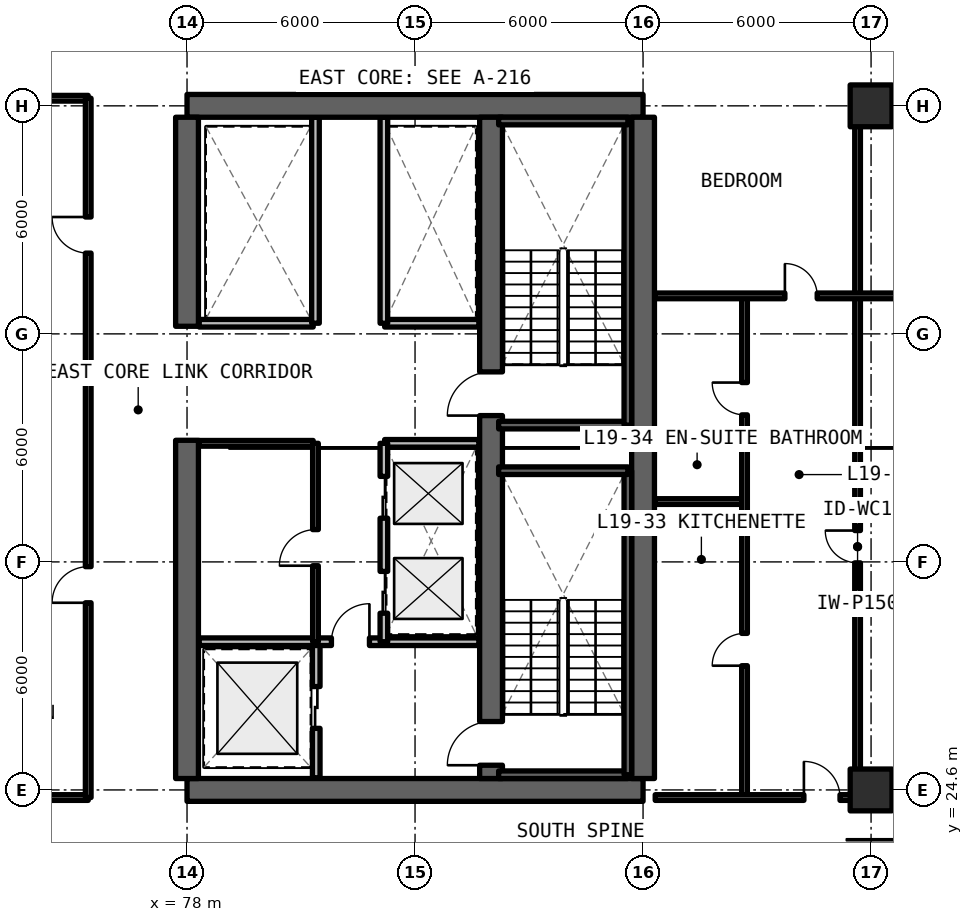
"""IFC4 building model, lengths in metres.
Left out: names, types, materials, properties, quantities, classifications, styles, units other than length and angle.
Written with IfcOpenShell. Run it as: python <this file> out.ifc"""

import sys

from ifc_helpers import new_model, si_unit, direction, frame, frame_2d, origin, origin_2d, place, context, subcontext, project, spatial, rectangle, extrude, element, fill, save


model = new_model("IFC4")
c1 = context("Model", 3, precision=1e-05, world=origin(), true_north=direction((0.0, 1.0)))
c2 = subcontext(c1, "Body", "Model", "MODEL_VIEW")
j1 = project(units=[si_unit("LENGTHUNIT", "METRE"), si_unit("PLANEANGLEUNIT", "RADIAN")], contexts=[c1])
p1 = place(None, origin())
s1 = spatial("IfcSite", under=j1, at=p1, CompositionType="ELEMENT")
p2 = place(p1, origin())
s2 = spatial("IfcBuilding", under=s1, at=p2, CompositionType="ELEMENT")
p3 = place(p2, frame((0.0, 0.0, 69.63)))
s3 = spatial("IfcBuildingStorey", under=s2, at=p3, CompositionType="ELEMENT", Elevation=69.63)
for number, where, z_axis, x_axis in (
    (1, (78.0, 24.6, 0.0), (0.0, 0.0, 1.0), (1.0, 0.0, 0.0)),
    (2, (90.0, 42.6, 0.0), (0.0, 0.0, 1.0), (-1.0, 0.0, 0.0)),
):
    element("IfcWall", number, at=place(p3, frame(where, z_axis=z_axis, x_axis=x_axis)), inside=s3, PredefinedType="SHEAR", context=c2, shape_type="SweptSolid", body=[
        extrude(rectangle(XDim=12.0, YDim=0.6, at=frame_2d((6.0, 0.0))), origin(), (0.0, 0.0, 1.0), 3.63),
    ])
p4 = place(p3, frame((90.0, 24.9, 0.0), z_axis=(0.0, 0.0, 1.0), x_axis=(0.0, 1.0, 0.0)))
e3 = element("IfcWall", 3, at=p4, inside=s3, PredefinedType="SHEAR", context=c2, shape_type="SweptSolid", body=[
    extrude(rectangle(XDim=17.4, YDim=0.6, at=frame_2d((8.7, 0.0))), origin(), (0.0, 0.0, 1.0), 3.63),
])
p5 = place(p3, frame((78.0, 24.9, 0.0), z_axis=(0.0, 0.0, 1.0), x_axis=(0.0, 1.0, 0.0)))
e4 = element("IfcWall", 4, at=p5, inside=s3, PredefinedType="SHEAR", context=c2, shape_type="SweptSolid", body=[
    extrude(rectangle(XDim=8.9, YDim=0.6, at=frame_2d((4.45, 0.0))), origin(), (0.0, 0.0, 1.0), 3.63),
])
p6 = place(p3, frame((78.0, 36.8, 0.0), z_axis=(0.0, 0.0, 1.0), x_axis=(0.0, 1.0, 0.0)))
e5 = element("IfcWall", 5, at=p6, inside=s3, PredefinedType="SHEAR", context=c2, shape_type="SweptSolid", body=[
    extrude(rectangle(XDim=5.5, YDim=0.6, at=frame_2d((2.75, 0.0))), origin(), (0.0, 0.0, 1.0), 3.63),
])
p7 = place(p3, frame((86.0, 24.9, 0.0), z_axis=(0.0, 0.0, 1.0), x_axis=(0.0, 1.0, 0.0)))
e6 = element("IfcWall", 6, at=p7, inside=s3, PredefinedType="SHEAR", context=c2, shape_type="SweptSolid", body=[
    extrude(rectangle(XDim=17.4, YDim=0.6, at=frame_2d((8.7, 0.0))), origin(), (0.0, 0.0, 1.0), 3.63),
])
p8 = place(p7, frame((0.35, 0.0, 0.0)))
e7 = element("IfcOpeningElement", 7, at=p8, cuts=e6, PredefinedType="OPENING", context=c2, shape_type="SweptSolid", body=[
    extrude(rectangle(XDim=1.15, YDim=2.15, at=frame_2d((0.575, 1.075))), frame((0.0, 0.31, 0.0), z_axis=(0.0, -1.0, 0.0), x_axis=(1.0, 0.0, 0.0)), (0.0, 0.0, 1.0), 0.62),
])
p9 = place(p7, frame((9.55, 0.0, 0.0)))
e8 = element("IfcOpeningElement", 8, at=p9, cuts=e6, PredefinedType="OPENING", context=c2, shape_type="SweptSolid", body=[
    extrude(rectangle(XDim=1.15, YDim=2.15, at=frame_2d((0.575, 1.075))), frame((0.0, 0.31, 0.0), z_axis=(0.0, -1.0, 0.0), x_axis=(1.0, 0.0, 0.0)), (0.0, 0.0, 1.0), 0.62),
])
for number, where, z_axis, x_axis in (
    (9, (96.0, 24.6, 0.0), (0.0, 0.0, 1.0), (1.0, 0.0, 0.0)),
    (10, (96.0, 42.6, 0.0), (0.0, 0.0, 1.0), (1.0, 0.0, 0.0)),
):
    element("IfcColumn", number, at=place(p3, frame(where, z_axis=z_axis, x_axis=x_axis)), inside=s3, PredefinedType="COLUMN", context=c2, shape_type="SweptSolid", body=[
        extrude(rectangle(XDim=1.1, YDim=1.1, at=origin_2d()), origin(), (0.0, 0.0, 1.0), 3.63),
    ])
p10 = place(p3, frame((81.4, 24.92, 0.0), z_axis=(0.0, 0.0, 1.0), x_axis=(0.0, 1.0, 0.0)))
e11 = element("IfcWall", 11, at=p10, inside=s3, PredefinedType="SOLIDWALL", context=c2, shape_type="SweptSolid", body=[
    extrude(rectangle(XDim=3.58, YDim=0.2, at=frame_2d((1.79, 0.0))), origin(), (0.0, 0.0, 1.0), 2.57),
])
p11 = place(p10, frame((1.3, 0.0, 0.0)))
e12 = element("IfcOpeningElement", 12, at=p11, cuts=e11, PredefinedType="OPENING", context=c2, shape_type="SweptSolid", body=[
    extrude(rectangle(XDim=1.1, YDim=2.2, at=frame_2d((0.55, 1.1))), frame((0.0, 0.11, 0.0), z_axis=(0.0, -1.0, 0.0), x_axis=(1.0, 0.0, 0.0)), (0.0, 0.0, 1.0), 0.22),
])
p12 = place(p3, frame((78.32, 28.5, 0.0), z_axis=(0.0, 0.0, 1.0), x_axis=(1.0, 0.0, 0.0)))
e13 = element("IfcWall", 13, at=p12, inside=s3, PredefinedType="SOLIDWALL", context=c2, shape_type="SweptSolid", body=[
    extrude(rectangle(XDim=7.36, YDim=0.2, at=frame_2d((3.68, 0.0))), origin(), (0.0, 0.0, 1.0), 2.57),
])
p13 = place(p12, frame((3.48, 0.0, 0.0)))
e14 = element("IfcOpeningElement", 14, at=p13, cuts=e13, PredefinedType="OPENING", context=c2, shape_type="SweptSolid", body=[
    extrude(rectangle(XDim=1.0, YDim=2.15, at=frame_2d((0.5, 1.075))), frame((0.0, 0.11, 0.0), z_axis=(0.0, -1.0, 0.0), x_axis=(1.0, 0.0, 0.0)), (0.0, 0.0, 1.0), 0.22),
])
p14 = place(p3, frame((83.2, 33.72, 0.0), z_axis=(0.0, 0.0, 1.0), x_axis=(1.0, 0.0, 0.0)))
e15 = element("IfcWall", 15, at=p14, inside=s3, PredefinedType="SOLIDWALL", context=c2, shape_type="SweptSolid", body=[
    extrude(rectangle(XDim=2.48, YDim=0.2, at=frame_2d((1.24, 0.0))), origin(), (0.0, 0.0, 1.0), 2.57),
])
p15 = place(p3, frame((83.18, 28.5, 0.0), z_axis=(0.0, 0.0, 1.0), x_axis=(0.0, 1.0, 0.0)))
e16 = element("IfcWall", 16, at=p15, inside=s3, PredefinedType="SOLIDWALL", context=c2, shape_type="SweptSolid", body=[
    extrude(rectangle(XDim=5.22, YDim=0.2, at=frame_2d((2.61, 0.0))), origin(), (0.0, 0.0, 1.0), 2.57),
])
p16 = place(p15, frame((0.75, 0.0, 0.0)))
e17 = element("IfcOpeningElement", 17, at=p16, cuts=e16, PredefinedType="OPENING", context=c2, shape_type="SweptSolid", body=[
    extrude(rectangle(XDim=1.1, YDim=2.2, at=frame_2d((0.55, 1.1))), frame((0.0, 0.11, 0.0), z_axis=(0.0, -1.0, 0.0), x_axis=(1.0, 0.0, 0.0)), (0.0, 0.0, 1.0), 0.22),
])
p17 = place(p15, frame((3.25, 0.0, 0.0)))
e18 = element("IfcOpeningElement", 18, at=p17, cuts=e16, PredefinedType="OPENING", context=c2, shape_type="SweptSolid", body=[
    extrude(rectangle(XDim=1.1, YDim=2.2, at=frame_2d((0.55, 1.1))), frame((0.0, 0.11, 0.0), z_axis=(0.0, -1.0, 0.0), x_axis=(1.0, 0.0, 0.0)), (0.0, 0.0, 1.0), 0.22),
])
p18 = place(p3, frame((78.32, 33.72, 0.0), z_axis=(0.0, 0.0, 1.0), x_axis=(1.0, 0.0, 0.0)))
e19 = element("IfcWall", 19, at=p18, inside=s3, PredefinedType="SOLIDWALL", context=c2, shape_type="SweptSolid", body=[
    extrude(rectangle(XDim=3.0, YDim=0.15, at=frame_2d((1.5, 0.0))), origin(), (0.0, 0.0, 1.0), 2.57),
])
p19 = place(p3, frame((81.38, 28.5, 0.0), z_axis=(0.0, 0.0, 1.0), x_axis=(0.0, 1.0, 0.0)))
e20 = element("IfcWall", 20, at=p19, inside=s3, PredefinedType="SOLIDWALL", context=c2, shape_type="SweptSolid", body=[
    extrude(rectangle(XDim=5.22, YDim=0.15, at=frame_2d((2.61, 0.0))), origin(), (0.0, 0.0, 1.0), 2.57),
])
p20 = place(p19, frame((2.0, 0.0, 0.0)))
e21 = element("IfcOpeningElement", 21, at=p20, cuts=e20, PredefinedType="OPENING", context=c2, shape_type="SweptSolid", body=[
    extrude(rectangle(XDim=0.95, YDim=2.15, at=frame_2d((0.475, 1.075))), frame((0.0, 0.085, 0.0), z_axis=(0.0, -1.0, 0.0), x_axis=(1.0, 0.0, 0.0)), (0.0, 0.0, 1.0), 0.17),
])
p21 = place(p3, frame((83.2, 36.88, 0.0), z_axis=(0.0, 0.0, 1.0), x_axis=(1.0, 0.0, 0.0)))
e22 = element("IfcWall", 22, at=p21, inside=s3, PredefinedType="SOLIDWALL", context=c2, shape_type="SweptSolid", body=[
    extrude(rectangle(XDim=2.48, YDim=0.2, at=frame_2d((1.24, 0.0))), origin(), (0.0, 0.0, 1.0), 2.57),
])
p22 = place(p3, frame((83.18, 36.88, 0.0), z_axis=(0.0, 0.0, 1.0), x_axis=(0.0, 1.0, 0.0)))
e23 = element("IfcWall", 23, at=p22, inside=s3, PredefinedType="SOLIDWALL", context=c2, shape_type="SweptSolid", body=[
    extrude(rectangle(XDim=5.42, YDim=0.2, at=frame_2d((2.71, 0.0))), origin(), (0.0, 0.0, 1.0), 2.57),
])
p23 = place(p3, frame((78.32, 36.88, 0.0), z_axis=(0.0, 0.0, 1.0), x_axis=(1.0, 0.0, 0.0)))
e24 = element("IfcWall", 24, at=p23, inside=s3, PredefinedType="SOLIDWALL", context=c2, shape_type="SweptSolid", body=[
    extrude(rectangle(XDim=3.0, YDim=0.2, at=frame_2d((1.5, 0.0))), origin(), (0.0, 0.0, 1.0), 2.57),
])
p24 = place(p3, frame((81.38, 36.88, 0.0), z_axis=(0.0, 0.0, 1.0), x_axis=(0.0, 1.0, 0.0)))
e25 = element("IfcWall", 25, at=p24, inside=s3, PredefinedType="SOLIDWALL", context=c2, shape_type="SweptSolid", body=[
    extrude(rectangle(XDim=5.42, YDim=0.2, at=frame_2d((2.71, 0.0))), origin(), (0.0, 0.0, 1.0), 2.57),
])
p25 = place(p3, frame((71.1, 24.4, 0.0), z_axis=(0.0, 0.0, 1.0), x_axis=(1.0, 0.0, 0.0)))
e26 = element("IfcWall", 26, at=p25, inside=s3, PredefinedType="SOLIDWALL", context=c2, shape_type="SweptSolid", body=[
    extrude(rectangle(XDim=4.3, YDim=0.15, at=frame_2d((2.15, 0.0))), origin(), (0.0, 0.0, 1.0), 2.565),
])
p26 = place(p3, frame((71.1, 35.6, 0.0), z_axis=(0.0, 0.0, 1.0), x_axis=(1.0, 0.0, 0.0)))
e27 = element("IfcWall", 27, at=p26, inside=s3, PredefinedType="SOLIDWALL", context=c2, shape_type="SweptSolid", body=[
    extrude(rectangle(XDim=4.3, YDim=0.15, at=frame_2d((2.15, 0.0))), origin(), (0.0, 0.0, 1.0), 2.57),
])
p27 = place(p3, frame((75.4, 24.4, 0.0), z_axis=(0.0, 0.0, 1.0), x_axis=(0.0, 1.0, 0.0)))
e28 = element("IfcWall", 28, at=p27, inside=s3, PredefinedType="SOLIDWALL", context=c2, shape_type="SweptSolid", body=[
    extrude(rectangle(XDim=11.2, YDim=0.15, at=frame_2d((5.6, 0.0))), origin(), (0.0, 0.0, 1.0), 2.57),
])
p28 = place(p27, frame((5.125, 0.0, 0.0)))
e29 = element("IfcOpeningElement", 29, at=p28, cuts=e28, PredefinedType="OPENING", context=c2, shape_type="SweptSolid", body=[
    extrude(rectangle(XDim=0.95, YDim=2.15, at=frame_2d((0.475, 1.075))), frame((0.0, 0.085, 0.0), z_axis=(0.0, -1.0, 0.0), x_axis=(1.0, 0.0, 0.0)), (0.0, 0.0, 1.0), 0.17),
])
p29 = place(p3, frame((71.1, 42.8, 0.0), z_axis=(0.0, 0.0, 1.0), x_axis=(1.0, 0.0, 0.0)))
e30 = element("IfcWall", 30, at=p29, inside=s3, PredefinedType="SOLIDWALL", context=c2, shape_type="SweptSolid", body=[
    extrude(rectangle(XDim=4.3, YDim=0.15, at=frame_2d((2.15, 0.0))), origin(), (0.0, 0.0, 1.0), 2.565),
])
p30 = place(p3, frame((75.4, 35.6, 0.0), z_axis=(0.0, 0.0, 1.0), x_axis=(0.0, 1.0, 0.0)))
e31 = element("IfcWall", 31, at=p30, inside=s3, PredefinedType="SOLIDWALL", context=c2, shape_type="SweptSolid", body=[
    extrude(rectangle(XDim=7.2, YDim=0.15, at=frame_2d((3.6, 0.0))), origin(), (0.0, 0.0, 1.0), 2.57),
])
p31 = place(p30, frame((3.125, 0.0, 0.0)))
e32 = element("IfcOpeningElement", 32, at=p31, cuts=e31, PredefinedType="OPENING", context=c2, shape_type="SweptSolid", body=[
    extrude(rectangle(XDim=0.95, YDim=2.15, at=frame_2d((0.475, 1.075))), frame((0.0, 0.085, 0.0), z_axis=(0.0, -1.0, 0.0), x_axis=(1.0, 0.0, 0.0)), (0.0, 0.0, 1.0), 0.17),
])
p32 = place(p3, frame((95.645, 24.4, 0.0), z_axis=(0.0, 0.0, 1.0), x_axis=(0.0, 1.0, 0.0)))
e33 = element("IfcWall", 33, at=p32, inside=s3, PredefinedType="PARTITIONING", context=c2, shape_type="SweptSolid", body=[
    extrude(rectangle(XDim=13.2, YDim=0.15, at=frame_2d((6.6, 0.0))), origin(), (0.0, 0.0, 1.0), 2.57),
])
p33 = place(p32, frame((6.175, 0.0, 0.0)))
e34 = element("IfcOpeningElement", 34, at=p33, cuts=e33, PredefinedType="OPENING", context=c2, shape_type="SweptSolid", body=[
    extrude(rectangle(XDim=0.85, YDim=2.1, at=frame_2d((0.425, 1.05))), frame((0.0, 0.085, 0.0), z_axis=(0.0, -1.0, 0.0), x_axis=(1.0, 0.0, 0.0)), (0.0, 0.0, 1.0), 0.17),
])
p34 = place(p3, frame((90.32, 32.188, 0.0), z_axis=(0.0, 0.0, 1.0), x_axis=(1.0, 0.0, 0.0)))
e35 = element("IfcWall", 35, at=p34, inside=s3, PredefinedType="PARTITIONING", context=c2, shape_type="SweptSolid", body=[
    extrude(rectangle(XDim=2.35, YDim=0.15, at=frame_2d((1.175, 0.0))), origin(), (0.0, 0.0, 1.0), 2.57),
])
p35 = place(p3, frame((92.67, 24.4, 0.0), z_axis=(0.0, 0.0, 1.0), x_axis=(0.0, 1.0, 0.0)))
e36 = element("IfcWall", 36, at=p35, inside=s3, PredefinedType="PARTITIONING", context=c2, shape_type="SweptSolid", body=[
    extrude(rectangle(XDim=13.2, YDim=0.15, at=frame_2d((6.6, 0.0))), origin(), (0.0, 0.0, 1.0), 2.57),
])
p36 = place(p35, frame((3.469, 0.0, 0.0)))
e37 = element("IfcOpeningElement", 37, at=p36, cuts=e36, PredefinedType="OPENING", context=c2, shape_type="SweptSolid", body=[
    extrude(rectangle(XDim=0.85, YDim=2.1, at=frame_2d((0.425, 1.05))), frame((0.0, 0.085, 0.0), z_axis=(0.0, -1.0, 0.0), x_axis=(1.0, 0.0, 0.0)), (0.0, 0.0, 1.0), 0.17),
])
p37 = place(p35, frame((10.069, 0.0, 0.0)))
e38 = element("IfcOpeningElement", 38, at=p37, cuts=e36, PredefinedType="OPENING", context=c2, shape_type="SweptSolid", body=[
    extrude(rectangle(XDim=0.85, YDim=2.1, at=frame_2d((0.425, 1.05))), frame((0.0, 0.085, 0.0), z_axis=(0.0, -1.0, 0.0), x_axis=(1.0, 0.0, 0.0)), (0.0, 0.0, 1.0), 0.17),
])
p38 = place(p3, frame((95.645, 37.6, 0.0), z_axis=(0.0, 0.0, 1.0), x_axis=(0.0, 1.0, 0.0)))
e39 = element("IfcWall", 39, at=p38, inside=s3, PredefinedType="PARTITIONING", context=c2, shape_type="SweptSolid", body=[
    extrude(rectangle(XDim=5.2, YDim=0.15, at=frame_2d((2.6, 0.0))), origin(), (0.0, 0.0, 1.0), 2.57),
])
p39 = place(p3, frame((90.32, 37.6, 0.0), z_axis=(0.0, 0.0, 1.0), x_axis=(1.0, 0.0, 0.0)))
e40 = element("IfcWall", 40, at=p39, inside=s3, PredefinedType="PARTITIONING", context=c2, shape_type="SweptSolid", body=[
    extrude(rectangle(XDim=10.24, YDim=0.15, at=frame_2d((5.12, 0.0))), origin(), (0.0, 0.0, 1.0), 2.57),
])
p40 = place(p39, frame((3.412, 0.0, 0.0)))
e41 = element("IfcOpeningElement", 41, at=p40, cuts=e40, PredefinedType="OPENING", context=c2, shape_type="SweptSolid", body=[
    extrude(rectangle(XDim=0.85, YDim=2.1, at=frame_2d((0.425, 1.05))), frame((0.0, 0.085, 0.0), z_axis=(0.0, -1.0, 0.0), x_axis=(1.0, 0.0, 0.0)), (0.0, 0.0, 1.0), 0.17),
])
p41 = place(p39, frame((7.357, 0.0, 0.0)))
e42 = element("IfcOpeningElement", 42, at=p41, cuts=e40, PredefinedType="OPENING", context=c2, shape_type="SweptSolid", body=[
    extrude(rectangle(XDim=0.85, YDim=2.1, at=frame_2d((0.425, 1.05))), frame((0.0, 0.085, 0.0), z_axis=(0.0, -1.0, 0.0), x_axis=(1.0, 0.0, 0.0)), (0.0, 0.0, 1.0), 0.17),
])
p42 = place(p3, frame((90.32, 24.4, 0.0), z_axis=(0.0, 0.0, 1.0), x_axis=(1.0, 0.0, 0.0)))
e43 = element("IfcWall", 43, at=p42, inside=s3, PredefinedType="SOLIDWALL", context=c2, shape_type="SweptSolid", body=[
    extrude(rectangle(XDim=10.24, YDim=0.15, at=frame_2d((5.12, 0.0))), origin(), (0.0, 0.0, 1.0), 2.565),
])
p43 = place(p42, frame((3.913, 0.0, 0.0)))
e44 = element("IfcOpeningElement", 44, at=p43, cuts=e43, PredefinedType="OPENING", context=c2, shape_type="SweptSolid", body=[
    extrude(rectangle(XDim=0.95, YDim=2.15, at=frame_2d((0.475, 1.075))), frame((0.0, 0.085, 0.0), z_axis=(0.0, -1.0, 0.0), x_axis=(1.0, 0.0, 0.0)), (0.0, 0.0, 1.0), 0.17),
])
p44 = place(p3, frame((86.2, 25.0, 0.0), z_axis=(0.0, 0.0, 1.0), x_axis=(1.0, 0.0, 0.0)))
e45 = element("IfcWall", 45, at=p44, inside=s3, PredefinedType="SOLIDWALL", context=c2, shape_type="SweptSolid", body=[
    extrude(rectangle(XDim=3.4, YDim=0.2, at=frame_2d((1.7, 0.0))), origin(), (0.0, 0.0, 1.0), 3.63),
])
p45 = place(p3, frame((89.6, 25.0, 0.0), z_axis=(0.0, 0.0, 1.0), x_axis=(0.0, 1.0, 0.0)))
e46 = element("IfcWall", 46, at=p45, inside=s3, PredefinedType="SOLIDWALL", context=c2, shape_type="SweptSolid", body=[
    extrude(rectangle(XDim=8.0, YDim=0.2, at=frame_2d((4.0, 0.0))), origin(), (0.0, 0.0, 1.0), 3.63),
])
for number, where, z_axis, x_axis in (
    (47, (89.6, 33.0, 0.0), (0.0, 0.0, 1.0), (-1.0, 0.0, 0.0)),
    (48, (86.2, 34.2, 0.0), (0.0, 0.0, 1.0), (1.0, 0.0, 0.0)),
):
    element("IfcWall", number, at=place(p3, frame(where, z_axis=z_axis, x_axis=x_axis)), inside=s3, PredefinedType="SOLIDWALL", context=c2, shape_type="SweptSolid", body=[
        extrude(rectangle(XDim=3.4, YDim=0.2, at=frame_2d((1.7, 0.0))), origin(), (0.0, 0.0, 1.0), 3.63),
    ])
p46 = place(p3, frame((89.6, 34.2, 0.0), z_axis=(0.0, 0.0, 1.0), x_axis=(0.0, 1.0, 0.0)))
e49 = element("IfcWall", 49, at=p46, inside=s3, PredefinedType="SOLIDWALL", context=c2, shape_type="SweptSolid", body=[
    extrude(rectangle(XDim=8.0, YDim=0.2, at=frame_2d((4.0, 0.0))), origin(), (0.0, 0.0, 1.0), 3.63),
])
p47 = place(p3, frame((89.6, 42.2, 0.0), z_axis=(0.0, 0.0, 1.0), x_axis=(-1.0, 0.0, 0.0)))
e50 = element("IfcWall", 50, at=p47, inside=s3, PredefinedType="SOLIDWALL", context=c2, shape_type="SweptSolid", body=[
    extrude(rectangle(XDim=3.4, YDim=0.2, at=frame_2d((1.7, 0.0))), origin(), (0.0, 0.0, 1.0), 3.63),
])
p48 = place(p11, origin())
e51 = element("IfcDoor", 51, at=p48, inside=s3, OperationType="SLIDING_TO_LEFT", PredefinedType="DOOR", context=c2, shape_type="SweptSolid", body=[
    extrude(rectangle(XDim=1.1, YDim=2.2, at=frame_2d((0.55, 1.1))), frame((0.0, 0.025, 0.0), z_axis=(0.0, -1.0, 0.0), x_axis=(1.0, 0.0, 0.0)), (0.0, 0.0, 1.0), 0.05),
])
fill(e12, e51)
p49 = place(p13, origin())
e52 = element("IfcDoor", 52, at=p49, inside=s3, OperationType="SINGLE_SWING_RIGHT", PredefinedType="DOOR", context=c2, shape_type="SweptSolid", body=[
    extrude(rectangle(XDim=1.0, YDim=2.15, at=frame_2d((0.5, 1.075))), frame((0.0, 0.025, 0.0), z_axis=(0.0, -1.0, 0.0), x_axis=(1.0, 0.0, 0.0)), (0.0, 0.0, 1.0), 0.05),
])
fill(e14, e52)
p50 = place(p16, origin())
e53 = element("IfcDoor", 53, at=p50, inside=s3, OperationType="SLIDING_TO_LEFT", PredefinedType="DOOR", context=c2, shape_type="SweptSolid", body=[
    extrude(rectangle(XDim=1.1, YDim=2.2, at=frame_2d((0.55, 1.1))), frame((0.0, 0.025, 0.0), z_axis=(0.0, -1.0, 0.0), x_axis=(1.0, 0.0, 0.0)), (0.0, 0.0, 1.0), 0.05),
])
fill(e17, e53)
p51 = place(p17, origin())
e54 = element("IfcDoor", 54, at=p51, inside=s3, OperationType="SLIDING_TO_RIGHT", PredefinedType="DOOR", context=c2, shape_type="SweptSolid", body=[
    extrude(rectangle(XDim=1.1, YDim=2.2, at=frame_2d((0.55, 1.1))), frame((0.0, 0.025, 0.0), z_axis=(0.0, -1.0, 0.0), x_axis=(1.0, 0.0, 0.0)), (0.0, 0.0, 1.0), 0.05),
])
fill(e18, e54)
p52 = place(p20, origin())
e55 = element("IfcDoor", 55, at=p52, inside=s3, OperationType="SINGLE_SWING_LEFT", PredefinedType="DOOR", context=c2, shape_type="SweptSolid", body=[
    extrude(rectangle(XDim=0.95, YDim=2.15, at=frame_2d((0.475, 1.075))), frame((0.0, 0.025, 0.0), z_axis=(0.0, -1.0, 0.0), x_axis=(1.0, 0.0, 0.0)), (0.0, 0.0, 1.0), 0.05),
])
fill(e21, e55)
p53 = place(p28, origin())
e56 = element("IfcDoor", 56, at=p53, inside=s3, OperationType="SINGLE_SWING_LEFT", PredefinedType="DOOR", context=c2, shape_type="SweptSolid", body=[
    extrude(rectangle(XDim=0.95, YDim=2.15, at=frame_2d((0.475, 1.075))), frame((0.0, 0.025, 0.0), z_axis=(0.0, -1.0, 0.0), x_axis=(1.0, 0.0, 0.0)), (0.0, 0.0, 1.0), 0.05),
])
fill(e29, e56)
p54 = place(p31, origin())
e57 = element("IfcDoor", 57, at=p54, inside=s3, OperationType="SINGLE_SWING_RIGHT", PredefinedType="DOOR", context=c2, shape_type="SweptSolid", body=[
    extrude(rectangle(XDim=0.95, YDim=2.15, at=frame_2d((0.475, 1.075))), frame((0.0, 0.025, 0.0), z_axis=(0.0, -1.0, 0.0), x_axis=(1.0, 0.0, 0.0)), (0.0, 0.0, 1.0), 0.05),
])
fill(e32, e57)
p55 = place(p33, origin())
e58 = element("IfcDoor", 58, at=p55, inside=s3, OperationType="SINGLE_SWING_RIGHT", PredefinedType="DOOR", context=c2, shape_type="SweptSolid", body=[
    extrude(rectangle(XDim=0.85, YDim=2.1, at=frame_2d((0.425, 1.05))), frame((0.0, 0.025, 0.0), z_axis=(0.0, -1.0, 0.0), x_axis=(1.0, 0.0, 0.0)), (0.0, 0.0, 1.0), 0.05),
])
fill(e34, e58)
p56 = place(p36, origin())
e59 = element("IfcDoor", 59, at=p56, inside=s3, OperationType="SINGLE_SWING_LEFT", PredefinedType="DOOR", context=c2, shape_type="SweptSolid", body=[
    extrude(rectangle(XDim=0.85, YDim=2.1, at=frame_2d((0.425, 1.05))), frame((0.0, 0.025, 0.0), z_axis=(0.0, -1.0, 0.0), x_axis=(1.0, 0.0, 0.0)), (0.0, 0.0, 1.0), 0.05),
])
fill(e37, e59)
p57 = place(p37, origin())
e60 = element("IfcDoor", 60, at=p57, inside=s3, OperationType="SINGLE_SWING_RIGHT", PredefinedType="DOOR", context=c2, shape_type="SweptSolid", body=[
    extrude(rectangle(XDim=0.85, YDim=2.1, at=frame_2d((0.425, 1.05))), frame((0.0, 0.025, 0.0), z_axis=(0.0, -1.0, 0.0), x_axis=(1.0, 0.0, 0.0)), (0.0, 0.0, 1.0), 0.05),
])
fill(e38, e60)
p58 = place(p40, origin())
e61 = element("IfcDoor", 61, at=p58, inside=s3, OperationType="SINGLE_SWING_LEFT", PredefinedType="DOOR", context=c2, shape_type="SweptSolid", body=[
    extrude(rectangle(XDim=0.85, YDim=2.1, at=frame_2d((0.425, 1.05))), frame((0.0, 0.025, 0.0), z_axis=(0.0, -1.0, 0.0), x_axis=(1.0, 0.0, 0.0)), (0.0, 0.0, 1.0), 0.05),
])
fill(e41, e61)
p59 = place(p43, origin())
e62 = element("IfcDoor", 62, at=p59, inside=s3, OperationType="SINGLE_SWING_LEFT", PredefinedType="DOOR", context=c2, shape_type="SweptSolid", body=[
    extrude(rectangle(XDim=0.95, YDim=2.15, at=frame_2d((0.475, 1.075))), frame((0.0, 0.025, 0.0), z_axis=(0.0, -1.0, 0.0), x_axis=(1.0, 0.0, 0.0)), (0.0, 0.0, 1.0), 0.05),
])
fill(e44, e62)
p60 = place(p8, origin())
e63 = element("IfcDoor", 63, at=p60, inside=s3, OperationType="SINGLE_SWING_RIGHT", PredefinedType="DOOR", context=c2, shape_type="SweptSolid", body=[
    extrude(rectangle(XDim=1.15, YDim=2.15, at=frame_2d((0.575, 1.075))), frame((0.0, 0.025, 0.0), z_axis=(0.0, -1.0, 0.0), x_axis=(1.0, 0.0, 0.0)), (0.0, 0.0, 1.0), 0.05),
])
fill(e7, e63)
p61 = place(p9, origin())
e64 = element("IfcDoor", 64, at=p61, inside=s3, OperationType="SINGLE_SWING_LEFT", PredefinedType="DOOR", context=c2, shape_type="SweptSolid", body=[
    extrude(rectangle(XDim=1.15, YDim=2.15, at=frame_2d((0.575, 1.075))), frame((0.0, 0.025, 0.0), z_axis=(0.0, -1.0, 0.0), x_axis=(1.0, 0.0, 0.0)), (0.0, 0.0, 1.0), 0.05),
])
fill(e8, e64)
save(model, sys.argv[1])
